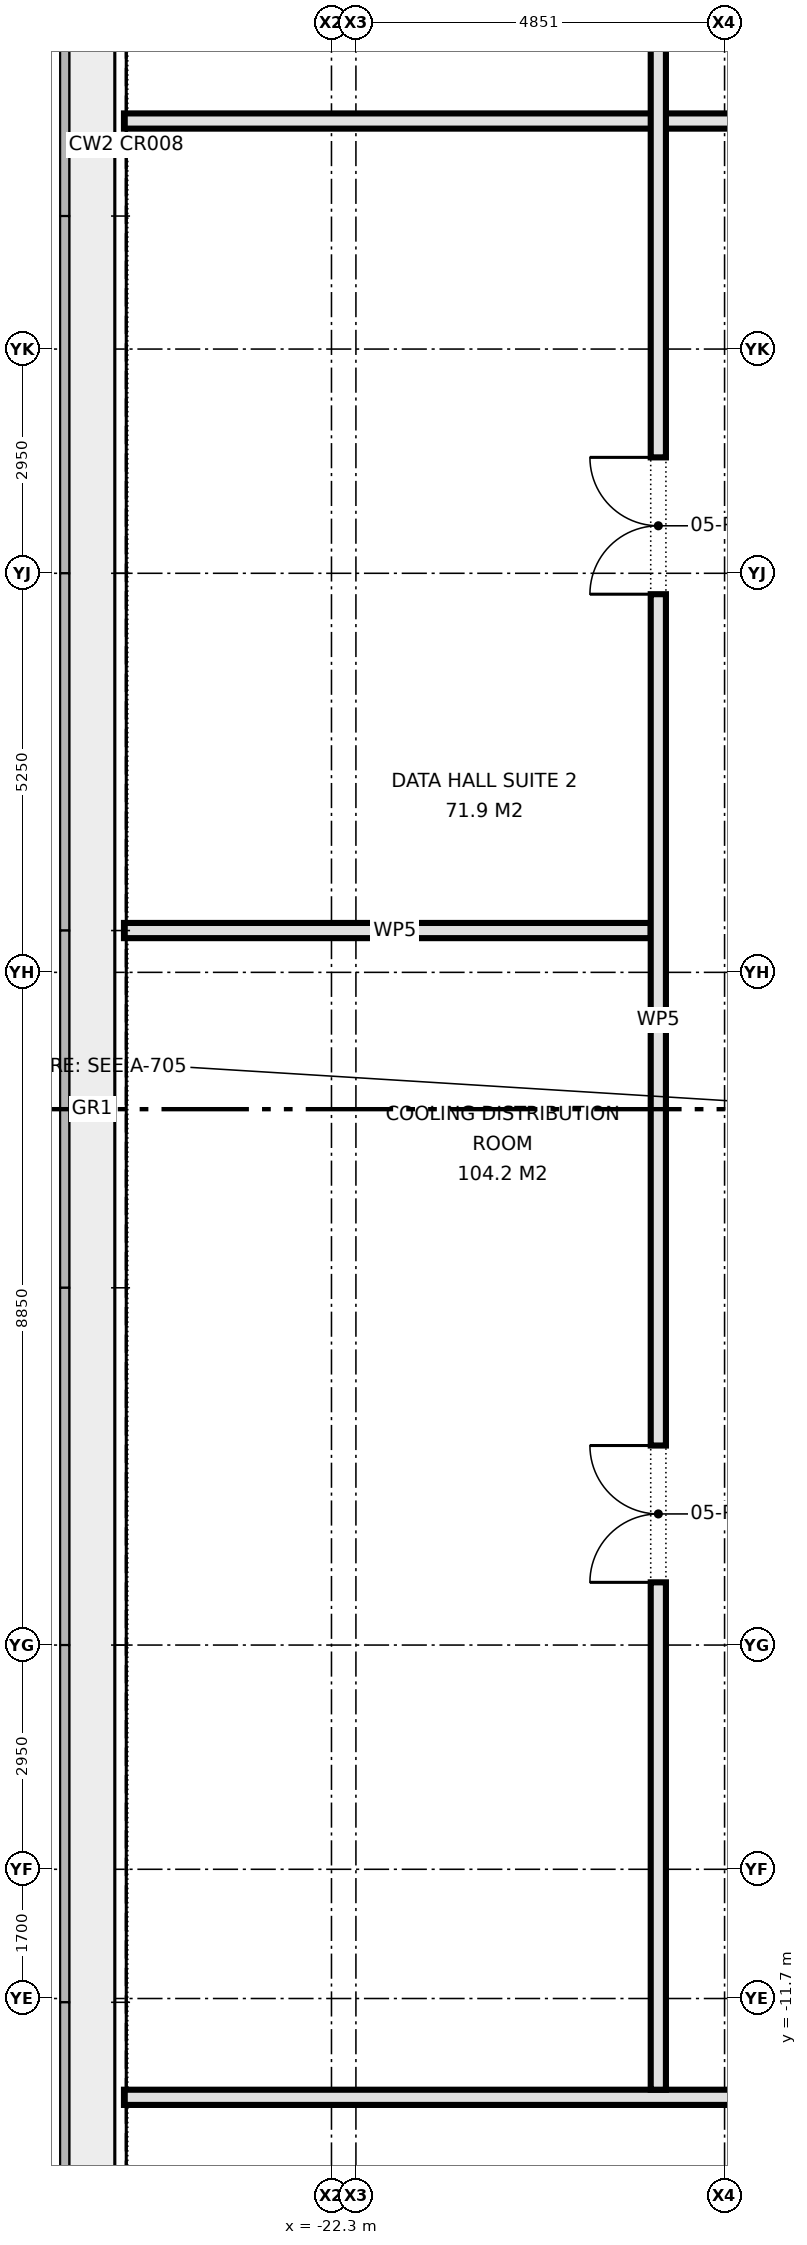
"""IFC4 building model, lengths in metres.
Left out: names, types, materials, properties, quantities, classifications, styles, units other than length and angle.
Written with IfcOpenShell. Run it as: python <this file> out.ifc"""

import sys

from ifc_helpers import new_model, si_unit, direction, frame, frame_2d, origin, place, context, subcontext, project, spatial, rectangle, extrude, element, fill, save


model = new_model("IFC4")
c1 = context("Model", 3, precision=1e-05, world=origin(), true_north=direction((0.0, 1.0)))
c2 = subcontext(c1, "Body", "Model", "MODEL_VIEW")
j1 = project(units=[si_unit("LENGTHUNIT", "METRE"), si_unit("PLANEANGLEUNIT", "RADIAN")], contexts=[c1])
p1 = place(None, origin())
s1 = spatial("IfcSite", under=j1, at=p1, CompositionType="ELEMENT")
p2 = place(p1, origin())
s2 = spatial("IfcBuilding", under=s1, at=p2, CompositionType="ELEMENT")
p3 = place(p2, frame((0.0, 0.0, 20.9)))
s3 = spatial("IfcBuildingStorey", under=s2, at=p3, CompositionType="ELEMENT", Elevation=20.9)
p4 = place(p3, frame((-25.03, -13.0, 0.0), z_axis=(0.0, 0.0, 1.0), x_axis=(1.0, 0.0, 0.0)))
e1 = element("IfcWall", 1, at=p4, inside=s3, PredefinedType="PARTITIONING", context=c2, shape_type="SweptSolid", body=[
    extrude(rectangle(XDim=50.06, YDim=0.2, at=frame_2d((25.03, 0.0))), origin(), (0.0, 0.0, 1.0), 4.575),
])
p5 = place(p4, frame((9.25, 0.0, 0.0)))
e2 = element("IfcOpeningElement", 2, at=p5, cuts=e1, PredefinedType="OPENING", context=c2, shape_type="SweptSolid", body=[
    extrude(rectangle(XDim=1.8, YDim=2.1, at=frame_2d((0.9, 1.05))), frame((0.0, 0.11, 0.0), z_axis=(0.0, -1.0, 0.0), x_axis=(1.0, 0.0, 0.0)), (0.0, 0.0, 1.0), 0.22),
])
p6 = place(p4, frame((17.08, 0.0, 0.0)))
e3 = element("IfcOpeningElement", 3, at=p6, cuts=e1, PredefinedType="OPENING", context=c2, shape_type="SweptSolid", body=[
    extrude(rectangle(XDim=1.8, YDim=2.1, at=frame_2d((0.9, 1.05))), frame((0.0, 0.11, 0.0), z_axis=(0.0, -1.0, 0.0), x_axis=(1.0, 0.0, 0.0)), (0.0, 0.0, 1.0), 0.22),
])
p7 = place(p4, frame((36.06, 0.0, 0.0)))
e4 = element("IfcOpeningElement", 4, at=p7, cuts=e1, PredefinedType="OPENING", context=c2, shape_type="SweptSolid", body=[
    extrude(rectangle(XDim=1.8, YDim=2.1, at=frame_2d((0.9, 1.05))), frame((0.0, 0.11, 0.0), z_axis=(0.0, -1.0, 0.0), x_axis=(1.0, 0.0, 0.0)), (0.0, 0.0, 1.0), 0.22),
])
p8 = place(p4, frame((23.68, 0.0, 0.0)))
e5 = element("IfcOpeningElement", 5, at=p8, cuts=e1, PredefinedType="OPENING", context=c2, shape_type="SweptSolid", body=[
    extrude(rectangle(XDim=1.0, YDim=2.1, at=frame_2d((0.5, 1.05))), frame((0.0, 0.11, 0.0), z_axis=(0.0, -1.0, 0.0), x_axis=(1.0, 0.0, 0.0)), (0.0, 0.0, 1.0), 0.22),
])
p9 = place(p4, frame((26.68, 0.0, 0.0)))
e6 = element("IfcOpeningElement", 6, at=p9, cuts=e1, PredefinedType="OPENING", context=c2, shape_type="SweptSolid", body=[
    extrude(rectangle(XDim=1.0, YDim=2.1, at=frame_2d((0.5, 1.05))), frame((0.0, 0.11, 0.0), z_axis=(0.0, -1.0, 0.0), x_axis=(1.0, 0.0, 0.0)), (0.0, 0.0, 1.0), 0.22),
])
p10 = place(p4, frame((29.28, 0.0, 0.0)))
e7 = element("IfcOpeningElement", 7, at=p10, cuts=e1, PredefinedType="OPENING", context=c2, shape_type="SweptSolid", body=[
    extrude(rectangle(XDim=1.0, YDim=2.1, at=frame_2d((0.5, 1.05))), frame((0.0, 0.11, 0.0), z_axis=(0.0, -1.0, 0.0), x_axis=(1.0, 0.0, 0.0)), (0.0, 0.0, 1.0), 0.22),
])
p11 = place(p3, frame((-25.03, 2.35, 0.0), z_axis=(0.0, 0.0, 1.0), x_axis=(1.0, 0.0, 0.0)))
e8 = element("IfcWall", 8, at=p11, inside=s3, PredefinedType="PARTITIONING", context=c2, shape_type="SweptSolid", body=[
    extrude(rectangle(XDim=6.93, YDim=0.2, at=frame_2d((3.465, 0.0))), origin(), (0.0, 0.0, 1.0), 4.575),
])
p12 = place(p3, frame((-25.03, 13.0, 0.0), z_axis=(0.0, 0.0, 1.0), x_axis=(1.0, 0.0, 0.0)))
e9 = element("IfcWall", 9, at=p12, inside=s3, PredefinedType="PARTITIONING", context=c2, shape_type="SweptSolid", body=[
    extrude(rectangle(XDim=50.06, YDim=0.2, at=frame_2d((25.03, 0.0))), origin(), (0.0, 0.0, 1.0), 4.575),
])
p13 = place(p12, frame((15.855, 0.0, 0.0)))
e10 = element("IfcOpeningElement", 10, at=p13, cuts=e9, PredefinedType="OPENING", context=c2, shape_type="SweptSolid", body=[
    extrude(rectangle(XDim=1.8, YDim=2.1, at=frame_2d((0.9, 1.05))), frame((0.0, 0.11, 0.0), z_axis=(0.0, -1.0, 0.0), x_axis=(1.0, 0.0, 0.0)), (0.0, 0.0, 1.0), 0.22),
])
p14 = place(p12, frame((8.03, 0.0, 0.0)))
e11 = element("IfcOpeningElement", 11, at=p14, cuts=e9, PredefinedType="OPENING", context=c2, shape_type="SweptSolid", body=[
    extrude(rectangle(XDim=1.8, YDim=2.1, at=frame_2d((0.9, 1.05))), frame((0.0, 0.11, 0.0), z_axis=(0.0, -1.0, 0.0), x_axis=(1.0, 0.0, 0.0)), (0.0, 0.0, 1.0), 0.22),
])
p15 = place(p12, frame((31.96, 0.0, 0.0)))
e12 = element("IfcOpeningElement", 12, at=p15, cuts=e9, PredefinedType="OPENING", context=c2, shape_type="SweptSolid", body=[
    extrude(rectangle(XDim=1.8, YDim=2.1, at=frame_2d((0.9, 1.05))), frame((0.0, 0.11, 0.0), z_axis=(0.0, -1.0, 0.0), x_axis=(1.0, 0.0, 0.0)), (0.0, 0.0, 1.0), 0.22),
])
p16 = place(p3, frame((-18.0, -12.9, 0.0), z_axis=(0.0, 0.0, 1.0), x_axis=(0.0, 1.0, 0.0)))
e13 = element("IfcWall", 13, at=p16, inside=s3, PredefinedType="PARTITIONING", context=c2, shape_type="SweptSolid", body=[
    extrude(rectangle(XDim=30.3, YDim=0.2, at=frame_2d((15.15, 0.0))), origin(), (0.0, 0.0, 1.0), 4.575),
])
p17 = place(p16, frame((6.675, 0.0, 0.0)))
e14 = element("IfcOpeningElement", 14, at=p17, cuts=e13, PredefinedType="OPENING", context=c2, shape_type="SweptSolid", body=[
    extrude(rectangle(XDim=1.8, YDim=2.1, at=frame_2d((0.9, 1.05))), frame((0.0, 0.11, 0.0), z_axis=(0.0, -1.0, 0.0), x_axis=(1.0, 0.0, 0.0)), (0.0, 0.0, 1.0), 0.22),
])
p18 = place(p16, frame((19.675, 0.0, 0.0)))
e15 = element("IfcOpeningElement", 15, at=p18, cuts=e13, PredefinedType="OPENING", context=c2, shape_type="SweptSolid", body=[
    extrude(rectangle(XDim=1.8, YDim=2.1, at=frame_2d((0.9, 1.05))), frame((0.0, 0.11, 0.0), z_axis=(0.0, -1.0, 0.0), x_axis=(1.0, 0.0, 0.0)), (0.0, 0.0, 1.0), 0.22),
])
p19 = place(p17, origin())
e16 = element("IfcDoor", 16, at=p19, inside=s3, OperationType="DOUBLE_DOOR_SINGLE_SWING", PredefinedType="DOOR", context=c2, shape_type="SweptSolid", body=[
    extrude(rectangle(XDim=1.8, YDim=2.1, at=frame_2d((0.9, 1.05))), frame((0.0, 0.025, 0.0), z_axis=(0.0, -1.0, 0.0), x_axis=(1.0, 0.0, 0.0)), (0.0, 0.0, 1.0), 0.05),
])
fill(e14, e16)
p20 = place(p18, origin())
e17 = element("IfcDoor", 17, at=p20, inside=s3, OperationType="DOUBLE_DOOR_SINGLE_SWING", PredefinedType="DOOR", context=c2, shape_type="SweptSolid", body=[
    extrude(rectangle(XDim=1.8, YDim=2.1, at=frame_2d((0.9, 1.05))), frame((0.0, 0.025, 0.0), z_axis=(0.0, -1.0, 0.0), x_axis=(1.0, 0.0, 0.0)), (0.0, 0.0, 1.0), 0.05),
])
fill(e15, e17)
save(model, sys.argv[1])
